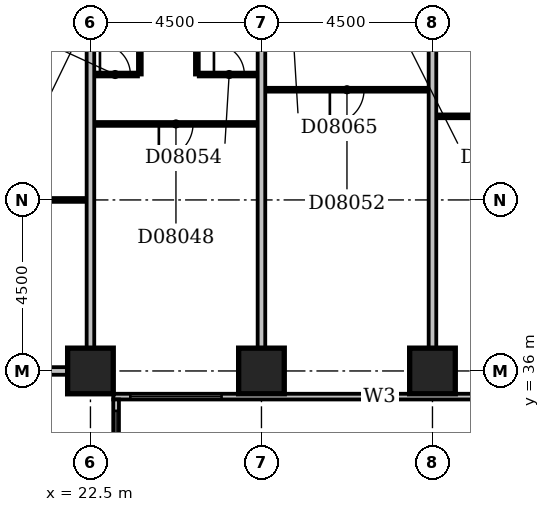
"""IFC4 building model, lengths in metres.
Left out: names, types, materials, properties, quantities, classifications, styles, units other than length and angle.
Written with IfcOpenShell. Run it as: python <this file> out.ifc"""

import sys

from ifc_helpers import new_model, si_unit, direction, frame, frame_2d, origin, origin_2d, place, context, subcontext, project, spatial, rectangle, extrude, element, fill, save


model = new_model("IFC4")
c1 = context("Model", 3, precision=1e-05, world=origin(), true_north=direction((0.0, 1.0)))
c2 = subcontext(c1, "Body", "Model", "MODEL_VIEW")
j1 = project(units=[si_unit("LENGTHUNIT", "METRE"), si_unit("PLANEANGLEUNIT", "RADIAN")], contexts=[c1])
p1 = place(None, origin())
s1 = spatial("IfcSite", under=j1, at=p1, CompositionType="ELEMENT")
p2 = place(p1, origin())
s2 = spatial("IfcBuilding", under=s1, at=p2, CompositionType="ELEMENT")
p3 = place(p2, frame((0.0, 0.0, 39.8)))
s3 = spatial("IfcBuildingStorey", under=s2, at=p3, CompositionType="ELEMENT", Elevation=39.8)
for number, where, z_axis, x_axis in (
    (1, (22.5, 36.0, -0.3), (0.0, 0.0, 1.0), (1.0, 0.0, 0.0)),
    (2, (27.0, 36.0, -0.3), (0.0, 0.0, 1.0), (1.0, 0.0, 0.0)),
    (3, (31.5, 36.0, -0.3), (0.0, 0.0, 1.0), (1.0, 0.0, 0.0)),
):
    element("IfcColumn", number, at=place(p3, frame(where, z_axis=z_axis, x_axis=x_axis)), inside=s3, PredefinedType="COLUMN", context=c2, shape_type="SweptSolid", body=[
        extrude(rectangle(XDim=1.2, YDim=1.2, at=origin_2d()), origin(), (0.0, 0.0, 1.0), 3.6),
    ])
p4 = place(p3, frame((23.175, 17.4, 0.0), z_axis=(0.0, 0.0, 1.0), x_axis=(0.0, 1.0, 0.0)))
e4 = element("IfcWall", 4, at=p4, inside=s3, PredefinedType="STANDARD", context=c2, shape_type="SweptSolid", body=[
    extrude(rectangle(XDim=17.85, YDim=0.15, at=frame_2d((8.925, 0.0))), origin(), (0.0, 0.0, 1.0), 2.7),
])
p5 = place(p4, frame((1.65, 0.0, 0.6)))
e5 = element("IfcOpeningElement", 5, at=p5, cuts=e4, PredefinedType="OPENING", context=c2, shape_type="SweptSolid", body=[
    extrude(rectangle(XDim=2.4, YDim=1.8, at=frame_2d((1.2, 0.9))), frame((0.0, 0.087, 0.0), z_axis=(0.0, -1.0, 0.0), x_axis=(1.0, 0.0, 0.0)), (0.0, 0.0, 1.0), 0.174),
])
p6 = place(p4, frame((5.854, 0.0, 0.6)))
e6 = element("IfcOpeningElement", 6, at=p6, cuts=e4, PredefinedType="OPENING", context=c2, shape_type="SweptSolid", body=[
    extrude(rectangle(XDim=0.45, YDim=1.8, at=frame_2d((0.225, 0.9))), frame((0.0, 0.087, 0.0), z_axis=(0.0, -1.0, 0.0), x_axis=(1.0, 0.0, 0.0)), (0.0, 0.0, 1.0), 0.174),
])
p7 = place(p4, frame((10.65, 0.0, 0.6)))
e7 = element("IfcOpeningElement", 7, at=p7, cuts=e4, PredefinedType="OPENING", context=c2, shape_type="SweptSolid", body=[
    extrude(rectangle(XDim=2.4, YDim=1.8, at=frame_2d((1.2, 0.9))), frame((0.0, 0.087, 0.0), z_axis=(0.0, -1.0, 0.0), x_axis=(1.0, 0.0, 0.0)), (0.0, 0.0, 1.0), 0.174),
])
p8 = place(p4, frame((15.15, 0.0, 0.6)))
e8 = element("IfcOpeningElement", 8, at=p8, cuts=e4, PredefinedType="OPENING", context=c2, shape_type="SweptSolid", body=[
    extrude(rectangle(XDim=2.4, YDim=1.8, at=frame_2d((1.2, 0.9))), frame((0.0, 0.087, 0.0), z_axis=(0.0, -1.0, 0.0), x_axis=(1.0, 0.0, 0.0)), (0.0, 0.0, 1.0), 0.174),
])
p9 = place(p3, frame((23.1, 35.325, 0.0), z_axis=(0.0, 0.0, 1.0), x_axis=(1.0, 0.0, 0.0)))
e9 = element("IfcWall", 9, at=p9, inside=s3, PredefinedType="STANDARD", context=c2, shape_type="SweptSolid", body=[
    extrude(rectangle(XDim=45.15, YDim=0.15, at=frame_2d((22.575, 0.0))), origin(), (0.0, 0.0, 1.0), 2.7),
])
p10 = place(p9, frame((0.45, 0.0, 0.6)))
e10 = element("IfcOpeningElement", 10, at=p10, cuts=e9, PredefinedType="OPENING", context=c2, shape_type="SweptSolid", body=[
    extrude(rectangle(XDim=2.4, YDim=1.8, at=frame_2d((1.2, 0.9))), frame((0.0, 0.087, 0.0), z_axis=(0.0, -1.0, 0.0), x_axis=(1.0, 0.0, 0.0)), (0.0, 0.0, 1.0), 0.174),
])
p11 = place(p9, frame((6.56, 0.0, 0.6)))
e11 = element("IfcOpeningElement", 11, at=p11, cuts=e9, PredefinedType="OPENING", context=c2, shape_type="SweptSolid", body=[
    extrude(rectangle(XDim=0.9, YDim=1.8, at=frame_2d((0.45, 0.9))), frame((0.0, 0.087, 0.0), z_axis=(0.0, -1.0, 0.0), x_axis=(1.0, 0.0, 0.0)), (0.0, 0.0, 1.0), 0.174),
])
p12 = place(p9, frame((9.45, 0.0, 0.6)))
e12 = element("IfcOpeningElement", 12, at=p12, cuts=e9, PredefinedType="OPENING", context=c2, shape_type="SweptSolid", body=[
    extrude(rectangle(XDim=2.4, YDim=1.8, at=frame_2d((1.2, 0.9))), frame((0.0, 0.087, 0.0), z_axis=(0.0, -1.0, 0.0), x_axis=(1.0, 0.0, 0.0)), (0.0, 0.0, 1.0), 0.174),
])
p13 = place(p9, frame((13.95, 0.0, 0.6)))
e13 = element("IfcOpeningElement", 13, at=p13, cuts=e9, PredefinedType="OPENING", context=c2, shape_type="SweptSolid", body=[
    extrude(rectangle(XDim=2.4, YDim=1.8, at=frame_2d((1.2, 0.9))), frame((0.0, 0.087, 0.0), z_axis=(0.0, -1.0, 0.0), x_axis=(1.0, 0.0, 0.0)), (0.0, 0.0, 1.0), 0.174),
])
p14 = place(p9, frame((18.33, 0.0, 0.6)))
e14 = element("IfcOpeningElement", 14, at=p14, cuts=e9, PredefinedType="OPENING", context=c2, shape_type="SweptSolid", body=[
    extrude(rectangle(XDim=1.5, YDim=1.8, at=frame_2d((0.75, 0.9))), frame((0.0, 0.087, 0.0), z_axis=(0.0, -1.0, 0.0), x_axis=(1.0, 0.0, 0.0)), (0.0, 0.0, 1.0), 0.174),
])
p15 = place(p9, frame((22.95, 0.0, 0.6)))
e15 = element("IfcOpeningElement", 15, at=p15, cuts=e9, PredefinedType="OPENING", context=c2, shape_type="SweptSolid", body=[
    extrude(rectangle(XDim=2.4, YDim=1.8, at=frame_2d((1.2, 0.9))), frame((0.0, 0.087, 0.0), z_axis=(0.0, -1.0, 0.0), x_axis=(1.0, 0.0, 0.0)), (0.0, 0.0, 1.0), 0.174),
])
p16 = place(p9, frame((27.45, 0.0, 0.6)))
e16 = element("IfcOpeningElement", 16, at=p16, cuts=e9, PredefinedType="OPENING", context=c2, shape_type="SweptSolid", body=[
    extrude(rectangle(XDim=2.4, YDim=1.8, at=frame_2d((1.2, 0.9))), frame((0.0, 0.087, 0.0), z_axis=(0.0, -1.0, 0.0), x_axis=(1.0, 0.0, 0.0)), (0.0, 0.0, 1.0), 0.174),
])
p17 = place(p9, frame((31.797, 0.0, 0.6)))
e17 = element("IfcOpeningElement", 17, at=p17, cuts=e9, PredefinedType="OPENING", context=c2, shape_type="SweptSolid", body=[
    extrude(rectangle(XDim=0.6, YDim=1.8, at=frame_2d((0.3, 0.9))), frame((0.0, 0.087, 0.0), z_axis=(0.0, -1.0, 0.0), x_axis=(1.0, 0.0, 0.0)), (0.0, 0.0, 1.0), 0.174),
])
p18 = place(p9, frame((36.45, 0.0, 0.6)))
e18 = element("IfcOpeningElement", 18, at=p18, cuts=e9, PredefinedType="OPENING", context=c2, shape_type="SweptSolid", body=[
    extrude(rectangle(XDim=2.4, YDim=1.8, at=frame_2d((1.2, 0.9))), frame((0.0, 0.087, 0.0), z_axis=(0.0, -1.0, 0.0), x_axis=(1.0, 0.0, 0.0)), (0.0, 0.0, 1.0), 0.174),
])
p19 = place(p9, frame((40.95, 0.0, 0.6)))
e19 = element("IfcOpeningElement", 19, at=p19, cuts=e9, PredefinedType="OPENING", context=c2, shape_type="SweptSolid", body=[
    extrude(rectangle(XDim=2.4, YDim=1.8, at=frame_2d((1.2, 0.9))), frame((0.0, 0.087, 0.0), z_axis=(0.0, -1.0, 0.0), x_axis=(1.0, 0.0, 0.0)), (0.0, 0.0, 1.0), 0.174),
])
p20 = place(p3, frame((9.1, 36.0, 0.0), z_axis=(0.0, 0.0, 1.0), x_axis=(1.0, 0.0, 0.0)))
e20 = element("IfcWall", 20, at=p20, inside=s3, PredefinedType="PARTITIONING", context=c2, shape_type="SweptSolid", body=[
    extrude(rectangle(XDim=12.8, YDim=0.2, at=frame_2d((6.4, 0.0))), origin(), (0.0, 0.0, 1.0), 2.4),
])
p21 = place(p3, frame((22.5, 36.6, 0.0), z_axis=(0.0, 0.0, 1.0), x_axis=(0.0, 1.0, 0.0)))
e21 = element("IfcWall", 21, at=p21, inside=s3, PredefinedType="PARTITIONING", context=c2, shape_type="SweptSolid", body=[
    extrude(rectangle(XDim=12.8, YDim=0.2, at=frame_2d((6.4, 0.0))), origin(), (0.0, 0.0, 1.0), 3.3),
])
p22 = place(p3, frame((27.0, 36.6, 0.0), z_axis=(0.0, 0.0, 1.0), x_axis=(0.0, 1.0, 0.0)))
e22 = element("IfcWall", 22, at=p22, inside=s3, PredefinedType="PARTITIONING", context=c2, shape_type="SweptSolid", body=[
    extrude(rectangle(XDim=12.8, YDim=0.2, at=frame_2d((6.4, 0.0))), origin(), (0.0, 0.0, 1.0), 2.6),
])
p23 = place(p3, frame((31.5, 36.6, 0.0), z_axis=(0.0, 0.0, 1.0), x_axis=(0.0, 1.0, 0.0)))
e23 = element("IfcWall", 23, at=p23, inside=s3, PredefinedType="PARTITIONING", context=c2, shape_type="SweptSolid", body=[
    extrude(rectangle(XDim=12.8, YDim=0.2, at=frame_2d((6.4, 0.0))), origin(), (0.0, 0.0, 1.0), 3.3),
])
p24 = place(p3, frame((9.1, 40.5, 0.0), z_axis=(0.0, 0.0, 1.0), x_axis=(1.0, 0.0, 0.0)))
e24 = element("IfcWall", 24, at=p24, inside=s3, PredefinedType="PARTITIONING", context=c2, shape_type="SweptSolid", body=[
    extrude(rectangle(XDim=13.3, YDim=0.1, at=frame_2d((6.65, 0.0))), origin(), (0.0, 0.0, 1.0), 3.3),
])
p25 = place(p3, frame((22.6, 42.5, 0.0), z_axis=(0.0, 0.0, 1.0), x_axis=(1.0, 0.0, 0.0)))
e25 = element("IfcWall", 25, at=p25, inside=s3, PredefinedType="PARTITIONING", context=c2, shape_type="SweptSolid", body=[
    extrude(rectangle(XDim=4.3, YDim=0.1, at=frame_2d((2.15, 0.0))), origin(), (0.0, 0.0, 1.0), 3.3),
])
p26 = place(p25, frame((1.7, 0.0, 0.0)))
e26 = element("IfcOpeningElement", 26, at=p26, cuts=e25, PredefinedType="OPENING", context=c2, shape_type="SweptSolid", body=[
    extrude(rectangle(XDim=0.9, YDim=2.1, at=frame_2d((0.45, 1.05))), frame((0.0, 0.062, 0.0), z_axis=(0.0, -1.0, 0.0), x_axis=(1.0, 0.0, 0.0)), (0.0, 0.0, 1.0), 0.124),
])
p27 = place(p3, frame((31.6, 42.7, 0.0), z_axis=(0.0, 0.0, 1.0), x_axis=(1.0, 0.0, 0.0)))
e27 = element("IfcWall", 27, at=p27, inside=s3, PredefinedType="PARTITIONING", context=c2, shape_type="SweptSolid", body=[
    extrude(rectangle(XDim=8.8, YDim=0.1, at=frame_2d((4.4, 0.0))), origin(), (0.0, 0.0, 1.0), 3.3),
])
p28 = place(p27, frame((1.7, 0.0, 0.0)))
e28 = element("IfcOpeningElement", 28, at=p28, cuts=e27, PredefinedType="OPENING", context=c2, shape_type="SweptSolid", body=[
    extrude(rectangle(XDim=0.9, YDim=2.1, at=frame_2d((0.45, 1.05))), frame((0.0, 0.062, 0.0), z_axis=(0.0, -1.0, 0.0), x_axis=(1.0, 0.0, 0.0)), (0.0, 0.0, 1.0), 0.124),
])
p29 = place(p27, frame((6.2, 0.0, 0.0)))
e29 = element("IfcOpeningElement", 29, at=p29, cuts=e27, PredefinedType="OPENING", context=c2, shape_type="SweptSolid", body=[
    extrude(rectangle(XDim=0.9, YDim=2.1, at=frame_2d((0.45, 1.05))), frame((0.0, 0.062, 0.0), z_axis=(0.0, -1.0, 0.0), x_axis=(1.0, 0.0, 0.0)), (0.0, 0.0, 1.0), 0.124),
])
p30 = place(p3, frame((27.1, 43.4, 0.0), z_axis=(0.0, 0.0, 1.0), x_axis=(1.0, 0.0, 0.0)))
e30 = element("IfcWall", 30, at=p30, inside=s3, PredefinedType="PARTITIONING", context=c2, shape_type="SweptSolid", body=[
    extrude(rectangle(XDim=4.3, YDim=0.1, at=frame_2d((2.15, 0.0))), origin(), (0.0, 0.0, 1.0), 3.3),
])
p31 = place(p30, frame((1.7, 0.0, 0.0)))
e31 = element("IfcOpeningElement", 31, at=p31, cuts=e30, PredefinedType="OPENING", context=c2, shape_type="SweptSolid", body=[
    extrude(rectangle(XDim=0.9, YDim=2.1, at=frame_2d((0.45, 1.05))), frame((0.0, 0.062, 0.0), z_axis=(0.0, -1.0, 0.0), x_axis=(1.0, 0.0, 0.0)), (0.0, 0.0, 1.0), 0.124),
])
p32 = place(p3, frame((22.6, 43.8, 0.0), z_axis=(0.0, 0.0, 1.0), x_axis=(1.0, 0.0, 0.0)))
e32 = element("IfcWall", 32, at=p32, inside=s3, PredefinedType="PARTITIONING", context=c2, shape_type="SweptSolid", body=[
    extrude(rectangle(XDim=1.15, YDim=0.1, at=frame_2d((0.575, 0.0))), origin(), (0.0, 0.0, 1.0), 3.3),
])
p33 = place(p32, frame((0.15, 0.0, 0.0)))
e33 = element("IfcOpeningElement", 33, at=p33, cuts=e32, PredefinedType="OPENING", context=c2, shape_type="SweptSolid", body=[
    extrude(rectangle(XDim=0.8, YDim=2.1, at=frame_2d((0.4, 1.05))), frame((0.0, 0.062, 0.0), z_axis=(0.0, -1.0, 0.0), x_axis=(1.0, 0.0, 0.0)), (0.0, 0.0, 1.0), 0.124),
])
p34 = place(p3, frame((23.8, 43.8, 0.0), z_axis=(0.0, 0.0, 1.0), x_axis=(0.0, 1.0, 0.0)))
e34 = element("IfcWall", 34, at=p34, inside=s3, PredefinedType="PARTITIONING", context=c2, shape_type="SweptSolid", body=[
    extrude(rectangle(XDim=5.6, YDim=0.1, at=frame_2d((2.8, 0.0))), origin(), (0.0, 0.0, 1.0), 3.3),
])
p35 = place(p3, frame((25.3, 43.8, 0.0), z_axis=(0.0, 0.0, 1.0), x_axis=(0.0, 1.0, 0.0)))
e35 = element("IfcWall", 35, at=p35, inside=s3, PredefinedType="PLUMBINGWALL", context=c2, shape_type="SweptSolid", body=[
    extrude(rectangle(XDim=5.6, YDim=0.1, at=frame_2d((2.8, 0.0))), origin(), (0.0, 0.0, 1.0), 3.3),
])
p36 = place(p3, frame((25.35, 43.8, 0.0), z_axis=(0.0, 0.0, 1.0), x_axis=(1.0, 0.0, 0.0)))
e36 = element("IfcWall", 36, at=p36, inside=s3, PredefinedType="PARTITIONING", context=c2, shape_type="SweptSolid", body=[
    extrude(rectangle(XDim=1.55, YDim=0.1, at=frame_2d((0.775, 0.0))), origin(), (0.0, 0.0, 1.0), 3.3),
])
p37 = place(p36, frame((0.4, 0.0, 0.0)))
e37 = element("IfcOpeningElement", 37, at=p37, cuts=e36, PredefinedType="OPENING", context=c2, shape_type="SweptSolid", body=[
    extrude(rectangle(XDim=0.8, YDim=2.1, at=frame_2d((0.4, 1.05))), frame((0.0, 0.062, 0.0), z_axis=(0.0, -1.0, 0.0), x_axis=(1.0, 0.0, 0.0)), (0.0, 0.0, 1.0), 0.124),
])
p38 = place(p8, origin())
e38 = element("IfcWindow", 38, at=p38, inside=s3, PartitioningType="SINGLE_PANEL", PredefinedType="WINDOW", context=c2, shape_type="SweptSolid", body=[
    extrude(rectangle(XDim=2.4, YDim=1.8, at=frame_2d((1.2, 0.9))), frame((0.0, 0.03, 0.0), z_axis=(0.0, -1.0, 0.0), x_axis=(1.0, 0.0, 0.0)), (0.0, 0.0, 1.0), 0.06),
])
fill(e8, e38)
p39 = place(p10, origin())
e39 = element("IfcWindow", 39, at=p39, inside=s3, PartitioningType="SINGLE_PANEL", PredefinedType="WINDOW", context=c2, shape_type="SweptSolid", body=[
    extrude(rectangle(XDim=2.4, YDim=1.8, at=frame_2d((1.2, 0.9))), frame((0.0, 0.03, 0.0), z_axis=(0.0, -1.0, 0.0), x_axis=(1.0, 0.0, 0.0)), (0.0, 0.0, 1.0), 0.06),
])
fill(e10, e39)
p40 = place(p11, origin())
e40 = element("IfcWindow", 40, at=p40, inside=s3, PartitioningType="SINGLE_PANEL", PredefinedType="WINDOW", context=c2, shape_type="SweptSolid", body=[
    extrude(rectangle(XDim=0.9, YDim=1.8, at=frame_2d((0.45, 0.9))), frame((0.0, 0.03, 0.0), z_axis=(0.0, -1.0, 0.0), x_axis=(1.0, 0.0, 0.0)), (0.0, 0.0, 1.0), 0.06),
])
fill(e11, e40)
p41 = place(p26, frame((0.9, 0.0, 0.0), z_axis=(0.0, 0.0, 1.0), x_axis=(-1.0, 0.0, 0.0)))
e41 = element("IfcDoor", 41, at=p41, inside=s3, OperationType="SINGLE_SWING_RIGHT", PredefinedType="DOOR", context=c2, shape_type="SweptSolid", body=[
    extrude(rectangle(XDim=0.9, YDim=2.1, at=frame_2d((0.45, 1.05))), frame((0.0, 0.025, 0.0), z_axis=(0.0, -1.0, 0.0), x_axis=(1.0, 0.0, 0.0)), (0.0, 0.0, 1.0), 0.05),
])
fill(e26, e41)
p42 = place(p31, frame((0.9, 0.0, 0.0), z_axis=(0.0, 0.0, 1.0), x_axis=(-1.0, 0.0, 0.0)))
e42 = element("IfcDoor", 42, at=p42, inside=s3, OperationType="SINGLE_SWING_RIGHT", PredefinedType="DOOR", context=c2, shape_type="SweptSolid", body=[
    extrude(rectangle(XDim=0.9, YDim=2.1, at=frame_2d((0.45, 1.05))), frame((0.0, 0.025, 0.0), z_axis=(0.0, -1.0, 0.0), x_axis=(1.0, 0.0, 0.0)), (0.0, 0.0, 1.0), 0.05),
])
fill(e31, e42)
p43 = place(p33, origin())
e43 = element("IfcDoor", 43, at=p43, inside=s3, OperationType="SINGLE_SWING_LEFT", PredefinedType="DOOR", context=c2, shape_type="SweptSolid", body=[
    extrude(rectangle(XDim=0.8, YDim=2.1, at=frame_2d((0.4, 1.05))), frame((0.0, 0.025, 0.0), z_axis=(0.0, -1.0, 0.0), x_axis=(1.0, 0.0, 0.0)), (0.0, 0.0, 1.0), 0.05),
])
fill(e33, e43)
p44 = place(p37, origin())
e44 = element("IfcDoor", 44, at=p44, inside=s3, OperationType="SINGLE_SWING_LEFT", PredefinedType="DOOR", context=c2, shape_type="SweptSolid", body=[
    extrude(rectangle(XDim=0.8, YDim=2.1, at=frame_2d((0.4, 1.05))), frame((0.0, 0.025, 0.0), z_axis=(0.0, -1.0, 0.0), x_axis=(1.0, 0.0, 0.0)), (0.0, 0.0, 1.0), 0.05),
])
fill(e37, e44)
save(model, sys.argv[1])
